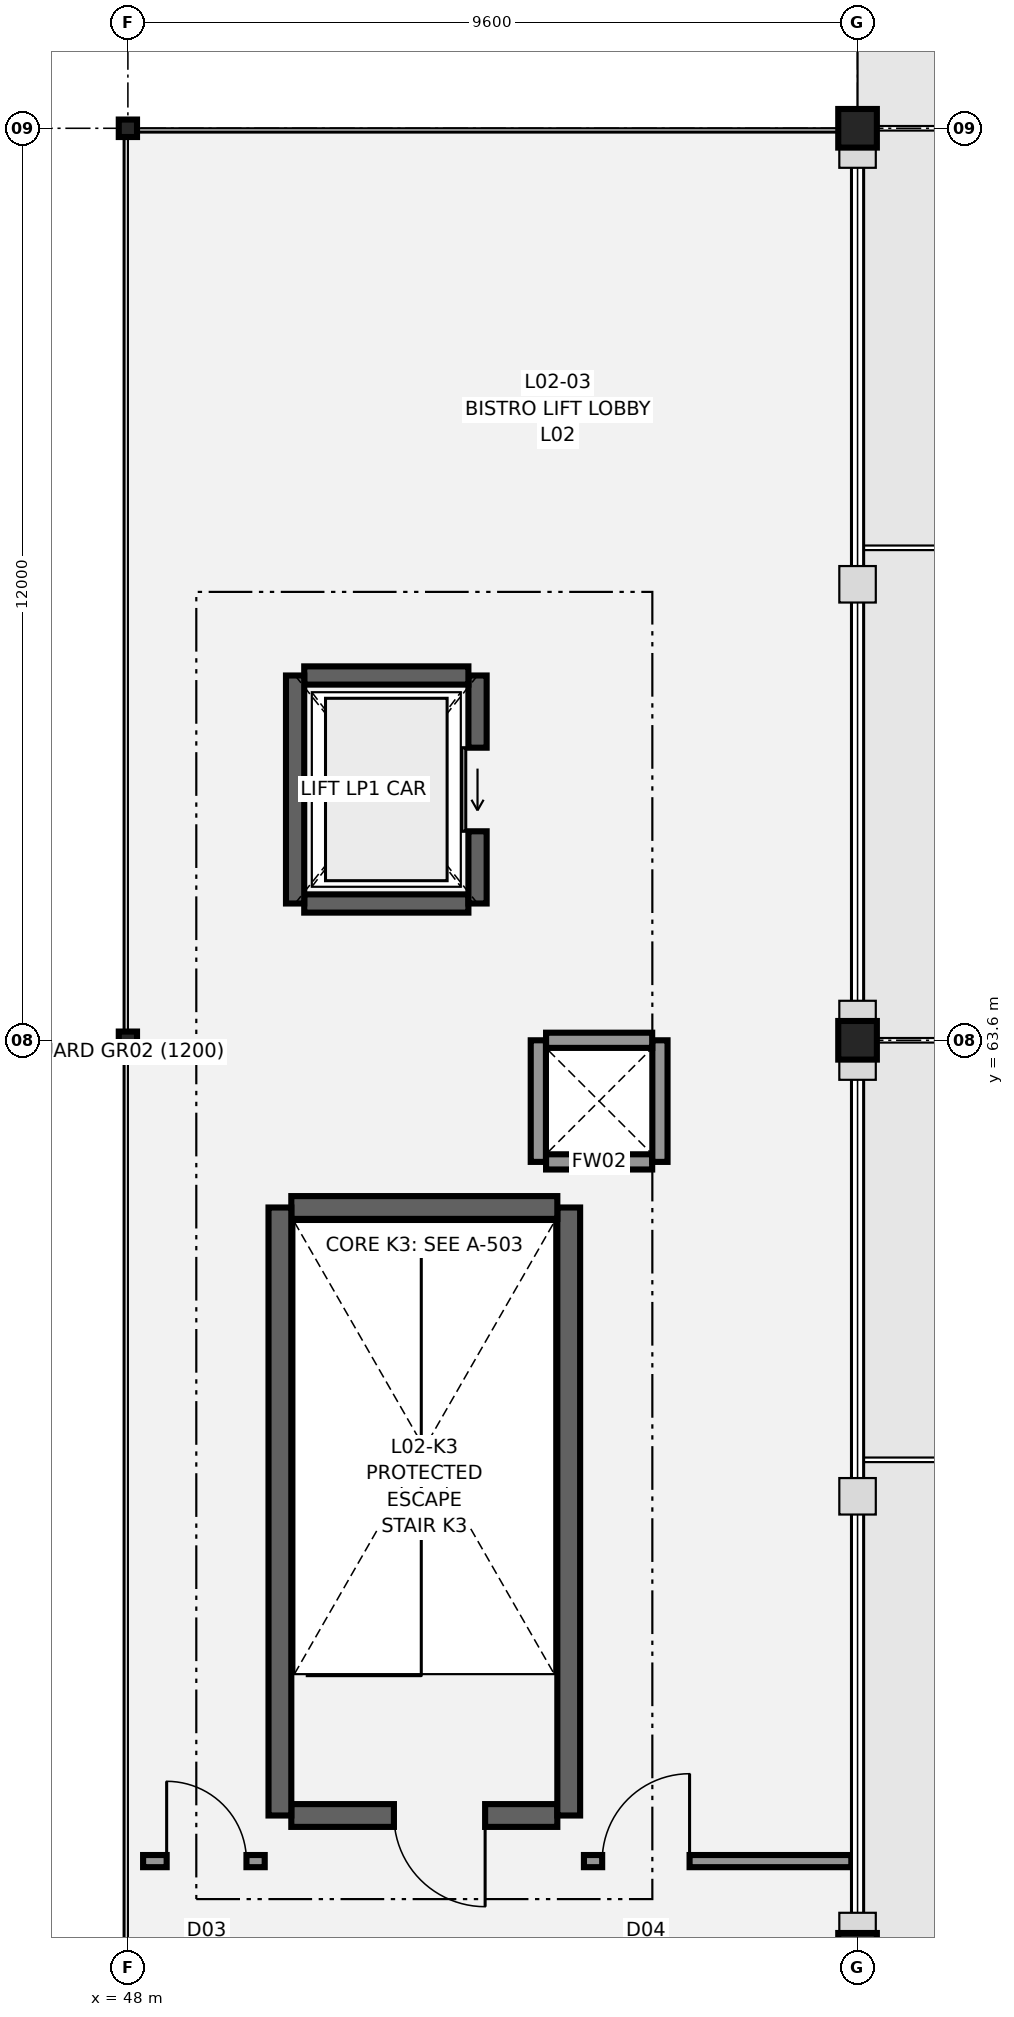
"""IFC4 building model, lengths in metres.
Left out: names, types, materials, properties, quantities, classifications, styles, units other than length and angle.
Written with IfcOpenShell. Run it as: python <this file> out.ifc"""

import sys

from ifc_helpers import new_model, si_unit, direction, frame, frame_2d, origin, origin_2d, place, context, subcontext, project, spatial, rectangle, hollow_circle, i_section, extrude, element, fill, save


model = new_model("IFC4")
c1 = context("Model", 3, precision=1e-05, world=origin(), true_north=direction((0.0, 1.0)))
c2 = subcontext(c1, "Body", "Model", "MODEL_VIEW")
j1 = project(units=[si_unit("LENGTHUNIT", "METRE"), si_unit("PLANEANGLEUNIT", "RADIAN")], contexts=[c1])
p1 = place(None, origin())
s1 = spatial("IfcSite", under=j1, at=p1, CompositionType="ELEMENT")
p2 = place(p1, origin())
s2 = spatial("IfcBuilding", under=s1, at=p2, CompositionType="ELEMENT")
p3 = place(p2, frame((0.0, 0.0, 10.2)))
s3 = spatial("IfcBuildingStorey", under=s2, at=p3, CompositionType="ELEMENT", Elevation=10.2)
for number, where, z_axis, x_axis in (
    (1, (48.0, 63.6, 0.0), (0.0, 0.0, 1.0), (1.0, 0.0, 0.0)),
    (2, (48.0, 75.6, 0.0), (0.0, 0.0, 1.0), (1.0, 0.0, 0.0)),
):
    element("IfcColumn", number, at=place(p3, frame(where, z_axis=z_axis, x_axis=x_axis)), inside=s3, PredefinedType="COLUMN", context=c2, shape_type="SweptSolid", body=[
        extrude(i_section(OverallWidth=0.24, OverallDepth=0.23, WebThickness=0.008, FlangeThickness=0.012, FilletRadius=0.021, at=origin_2d()), origin(), (0.0, 0.0, 1.0), 3.9),
    ])
for number, where, z_axis, x_axis in (
    (3, (57.6, 51.6, 0.0), (0.0, 0.0, 1.0), (1.0, 0.0, 0.0)),
    (4, (57.6, 63.6, 0.0), (0.0, 0.0, 1.0), (1.0, 0.0, 0.0)),
    (5, (57.6, 75.6, 0.0), (0.0, 0.0, 1.0), (1.0, 0.0, 0.0)),
):
    element("IfcColumn", number, at=place(p3, frame(where, z_axis=z_axis, x_axis=x_axis)), inside=s3, PredefinedType="COLUMN", context=c2, shape_type="SweptSolid", body=[
        extrude(hollow_circle(Radius=0.254, WallThickness=0.02, at=origin_2d()), origin(), (0.0, 0.0, 1.0), 3.9),
    ])
p4 = place(p3, frame((53.65, 53.4, 0.0), z_axis=(0.0, 0.0, 1.0), x_axis=(-1.0, 0.0, 0.0)))
e6 = element("IfcWall", 6, at=p4, inside=s3, PredefinedType="SHEAR", context=c2, shape_type="SweptSolid", body=[
    extrude(rectangle(XDim=3.5, YDim=0.3, at=frame_2d((1.75, 0.0))), origin(), (0.0, 0.0, 1.0), 3.9),
])
p5 = place(p4, frame((0.95, 0.0, 0.0)))
e7 = element("IfcOpeningElement", 7, at=p5, cuts=e6, PredefinedType="OPENING", context=c2, shape_type="SweptSolid", body=[
    extrude(rectangle(XDim=1.2, YDim=2.2, at=frame_2d((0.6, 1.1))), frame((0.0, 0.16, 0.0), z_axis=(0.0, -1.0, 0.0), x_axis=(1.0, 0.0, 0.0)), (0.0, 0.0, 1.0), 0.32),
])
p6 = place(p3, frame((53.8, 53.4, 0.0), z_axis=(0.0, 0.0, 1.0), x_axis=(0.0, 1.0, 0.0)))
e8 = element("IfcWall", 8, at=p6, inside=s3, PredefinedType="SHEAR", context=c2, shape_type="SweptSolid", body=[
    extrude(rectangle(XDim=8.0, YDim=0.3, at=frame_2d((4.0, 0.0))), origin(), (0.0, 0.0, 1.0), 3.9),
])
p7 = place(p3, frame((53.65, 61.4, 0.0), z_axis=(0.0, 0.0, 1.0), x_axis=(-1.0, 0.0, 0.0)))
e9 = element("IfcWall", 9, at=p7, inside=s3, PredefinedType="SHEAR", context=c2, shape_type="SweptSolid", body=[
    extrude(rectangle(XDim=3.5, YDim=0.3, at=frame_2d((1.75, 0.0))), origin(), (0.0, 0.0, 1.0), 3.9),
])
p8 = place(p3, frame((50.0, 61.4, 0.0), z_axis=(0.0, 0.0, 1.0), x_axis=(0.0, -1.0, 0.0)))
e10 = element("IfcWall", 10, at=p8, inside=s3, PredefinedType="SHEAR", context=c2, shape_type="SweptSolid", body=[
    extrude(rectangle(XDim=8.0, YDim=0.3, at=frame_2d((4.0, 0.0))), origin(), (0.0, 0.0, 1.0), 3.9),
])
p9 = place(p3, frame((50.32, 65.4, 0.0), z_axis=(0.0, 0.0, 1.0), x_axis=(1.0, 0.0, 0.0)))
e11 = element("IfcWall", 11, at=p9, inside=s3, PredefinedType="SHEAR", context=c2, shape_type="SweptSolid", body=[
    extrude(rectangle(XDim=2.16, YDim=0.24, at=frame_2d((1.08, 0.0))), origin(), (0.0, 0.0, 1.0), 3.9),
])
p10 = place(p3, frame((52.6, 65.4, 0.0), z_axis=(0.0, 0.0, 1.0), x_axis=(0.0, 1.0, 0.0)))
e12 = element("IfcWall", 12, at=p10, inside=s3, PredefinedType="SHEAR", context=c2, shape_type="SweptSolid", body=[
    extrude(rectangle(XDim=3.0, YDim=0.24, at=frame_2d((1.5, 0.0))), origin(), (0.0, 0.0, 1.0), 3.9),
])
p11 = place(p10, frame((0.95, 0.0, 0.0)))
e13 = element("IfcOpeningElement", 13, at=p11, cuts=e12, PredefinedType="OPENING", context=c2, shape_type="SweptSolid", body=[
    extrude(rectangle(XDim=1.1, YDim=2.1, at=frame_2d((0.55, 1.05))), frame((0.0, 0.13, 0.0), z_axis=(0.0, -1.0, 0.0), x_axis=(1.0, 0.0, 0.0)), (0.0, 0.0, 1.0), 0.26),
])
p12 = place(p3, frame((52.48, 68.4, 0.0), z_axis=(0.0, 0.0, 1.0), x_axis=(-1.0, 0.0, 0.0)))
e14 = element("IfcWall", 14, at=p12, inside=s3, PredefinedType="SHEAR", context=c2, shape_type="SweptSolid", body=[
    extrude(rectangle(XDim=2.16, YDim=0.24, at=frame_2d((1.08, 0.0))), origin(), (0.0, 0.0, 1.0), 3.9),
])
p13 = place(p3, frame((50.2, 68.4, 0.0), z_axis=(0.0, 0.0, 1.0), x_axis=(0.0, -1.0, 0.0)))
e15 = element("IfcWall", 15, at=p13, inside=s3, PredefinedType="SHEAR", context=c2, shape_type="SweptSolid", body=[
    extrude(rectangle(XDim=3.0, YDim=0.24, at=frame_2d((1.5, 0.0))), origin(), (0.0, 0.0, 1.0), 3.9),
])
p14 = place(p3, frame((48.2, 52.8, 0.0), z_axis=(0.0, 0.0, 1.0), x_axis=(1.0, 0.0, 0.0)))
e16 = element("IfcWall", 16, at=p14, inside=s3, PredefinedType="PARTITIONING", context=c2, shape_type="SweptSolid", body=[
    extrude(rectangle(XDim=1.6, YDim=0.16, at=frame_2d((0.8, 0.0))), origin(), (0.0, 0.0, 1.0), 3.58),
])
p15 = place(p14, frame((0.31, 0.0, 0.0)))
e17 = element("IfcOpeningElement", 17, at=p15, cuts=e16, PredefinedType="OPENING", context=c2, shape_type="SweptSolid", body=[
    extrude(rectangle(XDim=1.05, YDim=2.15, at=frame_2d((0.525, 1.075))), frame((0.0, 0.09, 0.0), z_axis=(0.0, -1.0, 0.0), x_axis=(1.0, 0.0, 0.0)), (0.0, 0.0, 1.0), 0.18),
])
p16 = place(p3, frame((54.0, 52.8, 0.0), z_axis=(0.0, 0.0, 1.0), x_axis=(1.0, 0.0, 0.0)))
e18 = element("IfcWall", 18, at=p16, inside=s3, PredefinedType="PARTITIONING", context=c2, shape_type="SweptSolid", body=[
    extrude(rectangle(XDim=3.518, YDim=0.16, at=frame_2d((1.759, 0.0))), origin(), (0.0, 0.0, 1.0), 3.58),
])
p17 = place(p16, frame((0.24, 0.0, 0.0)))
e19 = element("IfcOpeningElement", 19, at=p17, cuts=e18, PredefinedType="OPENING", context=c2, shape_type="SweptSolid", body=[
    extrude(rectangle(XDim=1.15, YDim=2.15, at=frame_2d((0.575, 1.075))), frame((0.0, 0.09, 0.0), z_axis=(0.0, -1.0, 0.0), x_axis=(1.0, 0.0, 0.0)), (0.0, 0.0, 1.0), 0.18),
])
p18 = place(p3, frame((53.502, 62.0, 0.0), z_axis=(0.0, 0.0, 1.0), x_axis=(1.0, 0.0, 0.0)))
e20 = element("IfcWall", 20, at=p18, inside=s3, PredefinedType="PARTITIONING", context=c2, shape_type="SweptSolid", body=[
    extrude(rectangle(XDim=1.396, YDim=0.2, at=frame_2d((0.698, 0.0))), origin(), (0.0, 0.0, 1.0), 3.58),
])
p19 = place(p3, frame((55.0, 62.0, 0.0), z_axis=(0.0, 0.0, 1.0), x_axis=(0.0, 1.0, 0.0)))
e21 = element("IfcWall", 21, at=p19, inside=s3, PredefinedType="PARTITIONING", context=c2, shape_type="SweptSolid", body=[
    extrude(rectangle(XDim=1.6, YDim=0.2, at=frame_2d((0.8, 0.0))), origin(), (0.0, 0.0, 1.0), 3.58),
])
p20 = place(p3, frame((54.898, 63.6, 0.0), z_axis=(0.0, 0.0, 1.0), x_axis=(-1.0, 0.0, 0.0)))
e22 = element("IfcWall", 22, at=p20, inside=s3, PredefinedType="PARTITIONING", context=c2, shape_type="SweptSolid", body=[
    extrude(rectangle(XDim=1.396, YDim=0.2, at=frame_2d((0.698, 0.0))), origin(), (0.0, 0.0, 1.0), 3.58),
])
p21 = place(p3, frame((53.4, 63.6, 0.0), z_axis=(0.0, 0.0, 1.0), x_axis=(0.0, -1.0, 0.0)))
e23 = element("IfcWall", 23, at=p21, inside=s3, PredefinedType="PARTITIONING", context=c2, shape_type="SweptSolid", body=[
    extrude(rectangle(XDim=1.6, YDim=0.2, at=frame_2d((0.8, 0.0))), origin(), (0.0, 0.0, 1.0), 3.58),
])
p22 = place(p15, origin())
e24 = element("IfcDoor", 24, at=p22, inside=s3, OperationType="SINGLE_SWING_LEFT", PredefinedType="DOOR", context=c2, shape_type="SweptSolid", body=[
    extrude(rectangle(XDim=1.05, YDim=2.15, at=frame_2d((0.525, 1.075))), frame((0.0, 0.025, 0.0), z_axis=(0.0, -1.0, 0.0), x_axis=(1.0, 0.0, 0.0)), (0.0, 0.0, 1.0), 0.05),
])
fill(e17, e24)
p23 = place(p17, origin())
e25 = element("IfcDoor", 25, at=p23, inside=s3, OperationType="SINGLE_SWING_RIGHT", PredefinedType="DOOR", context=c2, shape_type="SweptSolid", body=[
    extrude(rectangle(XDim=1.15, YDim=2.15, at=frame_2d((0.575, 1.075))), frame((0.0, 0.025, 0.0), z_axis=(0.0, -1.0, 0.0), x_axis=(1.0, 0.0, 0.0)), (0.0, 0.0, 1.0), 0.05),
])
fill(e19, e25)
p24 = place(p5, origin())
e26 = element("IfcDoor", 26, at=p24, inside=s3, OperationType="SINGLE_SWING_LEFT", PredefinedType="DOOR", context=c2, shape_type="SweptSolid", body=[
    extrude(rectangle(XDim=1.2, YDim=2.2, at=frame_2d((0.6, 1.1))), frame((0.0, 0.025, 0.0), z_axis=(0.0, -1.0, 0.0), x_axis=(1.0, 0.0, 0.0)), (0.0, 0.0, 1.0), 0.05),
])
fill(e7, e26)
p25 = place(p11, origin())
e27 = element("IfcDoor", 27, at=p25, inside=s3, OperationType="SLIDING_TO_LEFT", PredefinedType="DOOR", context=c2, shape_type="SweptSolid", body=[
    extrude(rectangle(XDim=1.1, YDim=2.1, at=frame_2d((0.55, 1.05))), frame((0.0, 0.025, 0.0), z_axis=(0.0, -1.0, 0.0), x_axis=(1.0, 0.0, 0.0)), (0.0, 0.0, 1.0), 0.05),
])
fill(e13, e27)
save(model, sys.argv[1])
